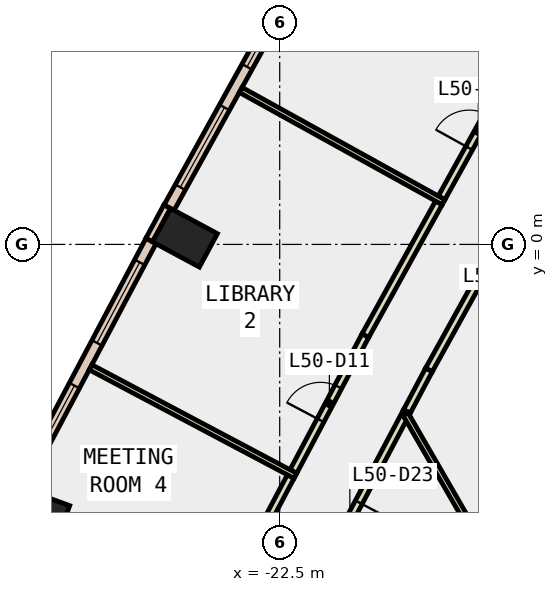
"""IFC4 building model, lengths in metres.
Left out: names, types, materials, properties, quantities, classifications, styles, units other than length and angle.
Written with IfcOpenShell. Run it as: python <this file> out.ifc"""

import sys

from ifc_helpers import new_model, si_unit, direction, frame, frame_2d, origin, origin_2d, place, context, subcontext, project, spatial, rectangle, extrude, element, fill, save


model = new_model("IFC4")
c1 = context("Model", 3, precision=1e-05, world=origin(), true_north=direction((0.0, 1.0)))
c2 = subcontext(c1, "Body", "Model", "MODEL_VIEW")
j1 = project(units=[si_unit("LENGTHUNIT", "METRE"), si_unit("PLANEANGLEUNIT", "RADIAN")], contexts=[c1])
p1 = place(None, origin())
s1 = spatial("IfcSite", under=j1, at=p1, CompositionType="ELEMENT")
p2 = place(p1, origin())
s2 = spatial("IfcBuilding", under=s1, at=p2, CompositionType="ELEMENT")
p3 = place(p2, frame((0.0, 0.0, 223.4)))
s3 = spatial("IfcBuildingStorey", under=s2, at=p3, CompositionType="ELEMENT", Elevation=223.4)
for number, where, z_axis, x_axis in (
    (1, (-24.993, 0.175, -0.4), (0.0, 0.0, 1.0), (0.474, 0.88, 0.0)),
    (2, (-28.856, -7.1, -0.4), (0.0, 0.0, 1.0), (0.347, 0.938, 0.0)),
):
    element("IfcColumn", number, at=place(p3, frame(where, z_axis=z_axis, x_axis=x_axis)), inside=s3, PredefinedType="COLUMN", context=c2, shape_type="SweptSolid", body=[
        extrude(rectangle(XDim=1.0, YDim=1.4, at=origin_2d()), origin(), (0.0, 0.0, 1.0), 4.2),
    ])
p4 = place(p3, frame((-25.46, 0.995, 0.0), z_axis=(0.0, 0.0, 1.0), x_axis=(-0.473852444207, -0.880604259085, 0.0)))
e3 = element("IfcWall", 3, at=p4, inside=s3, PredefinedType="STANDARD", context=c2, shape_type="SweptSolid", body=[
    extrude(rectangle(XDim=1.0, YDim=0.2, at=frame_2d((0.5, 0.0))), origin(), (0.0, 0.0, 1.0), 3.8),
])
p5 = place(p3, frame((-21.902, 7.309, 0.0), z_axis=(0.0, 0.0, 1.0), x_axis=(-0.484163461668, -0.87497756679, 0.0)))
e4 = element("IfcWall", 4, at=p5, inside=s3, PredefinedType="STANDARD", context=c2, shape_type="SweptSolid", body=[
    extrude(rectangle(XDim=7.247, YDim=0.3, at=frame_2d((3.624, 0.0))), origin(), (0.0, 0.0, 1.0), 3.8),
])
p6 = place(p5, frame((0.612, 0.0, 0.9)))
e5 = element("IfcOpeningElement", 5, at=p6, cuts=e4, PredefinedType="OPENING", context=c2, shape_type="SweptSolid", body=[
    extrude(rectangle(XDim=2.4, YDim=2.6, at=frame_2d((1.2, 1.3))), frame((0.0, 0.16, 0.0), z_axis=(0.0, -1.0, 0.0), x_axis=(1.0, 0.0, 0.0)), (0.0, 0.0, 1.0), 0.32),
])
p7 = place(p5, frame((4.235, 0.0, 0.9)))
e6 = element("IfcOpeningElement", 6, at=p7, cuts=e4, PredefinedType="OPENING", context=c2, shape_type="SweptSolid", body=[
    extrude(rectangle(XDim=2.4, YDim=2.6, at=frame_2d((1.2, 1.3))), frame((0.0, 0.16, 0.0), z_axis=(0.0, -1.0, 0.0), x_axis=(1.0, 0.0, 0.0)), (0.0, 0.0, 1.0), 0.32),
])
p8 = place(p3, frame((-25.887, 0.09, 0.0), z_axis=(0.0, 0.0, 1.0), x_axis=(-0.468020680141, -0.8837175131, 0.0)))
e7 = element("IfcWall", 7, at=p8, inside=s3, PredefinedType="STANDARD", context=c2, shape_type="SweptSolid", body=[
    extrude(rectangle(XDim=7.34, YDim=0.3, at=frame_2d((3.67, 0.0))), origin(), (0.0, 0.0, 1.0), 3.8),
])
p9 = place(p8, frame((0.635, 0.0, 0.9)))
e8 = element("IfcOpeningElement", 8, at=p9, cuts=e7, PredefinedType="OPENING", context=c2, shape_type="SweptSolid", body=[
    extrude(rectangle(XDim=2.4, YDim=2.6, at=frame_2d((1.2, 1.3))), frame((0.0, 0.16, 0.0), z_axis=(0.0, -1.0, 0.0), x_axis=(1.0, 0.0, 0.0)), (0.0, 0.0, 1.0), 0.32),
])
p10 = place(p8, frame((4.305, 0.0, 0.9)))
e9 = element("IfcOpeningElement", 9, at=p10, cuts=e7, PredefinedType="OPENING", context=c2, shape_type="SweptSolid", body=[
    extrude(rectangle(XDim=2.4, YDim=2.6, at=frame_2d((1.2, 1.3))), frame((0.0, 0.16, 0.0), z_axis=(0.0, -1.0, 0.0), x_axis=(1.0, 0.0, 0.0)), (0.0, 0.0, 1.0), 0.32),
])
p11 = place(p3, frame((-14.652, 3.783, 0.0), z_axis=(0.0, 0.0, 1.0), x_axis=(-0.484249955458, -0.874929700398, 0.0)))
e10 = element("IfcWall", 10, at=p11, inside=s3, PredefinedType="PARTITIONING", context=c2, shape_type="SweptSolid", body=[
    extrude(rectangle(XDim=8.099, YDim=0.2, at=frame_2d((4.049, 0.0))), origin(), (0.0, 0.0, 1.0), 3.8),
])
p12 = place(p11, frame((3.55, 0.0, 0.0)))
e11 = element("IfcOpeningElement", 11, at=p12, cuts=e10, PredefinedType="OPENING", context=c2, shape_type="SweptSolid", body=[
    extrude(rectangle(XDim=1.0, YDim=2.1, at=frame_2d((0.5, 1.05))), frame((0.0, 0.11, 0.0), z_axis=(0.0, -1.0, 0.0), x_axis=(1.0, 0.0, 0.0)), (0.0, 0.0, 1.0), 0.22),
])
p13 = place(p3, frame((-18.574, -3.303, 0.0), z_axis=(0.0, 0.0, 1.0), x_axis=(-0.468458328651, -0.883485593724, 0.0)))
e12 = element("IfcWall", 12, at=p13, inside=s3, PredefinedType="PARTITIONING", context=c2, shape_type="SweptSolid", body=[
    extrude(rectangle(XDim=1.238, YDim=0.2, at=frame_2d((0.619, 0.0))), origin(), (0.0, 0.0, 1.0), 3.8),
])
p14 = place(p3, frame((-19.154, -4.397, 0.0), z_axis=(0.0, 0.0, 1.0), x_axis=(-0.468118749105, -0.883665568378, 0.0)))
e13 = element("IfcWall", 13, at=p14, inside=s3, PredefinedType="PARTITIONING", context=c2, shape_type="SweptSolid", body=[
    extrude(rectangle(XDim=6.409, YDim=0.2, at=frame_2d((3.204, 0.0))), origin(), (0.0, 0.0, 1.0), 3.8),
])
p15 = place(p14, frame((2.704, 0.0, 0.0)))
e14 = element("IfcOpeningElement", 14, at=p15, cuts=e13, PredefinedType="OPENING", context=c2, shape_type="SweptSolid", body=[
    extrude(rectangle(XDim=1.0, YDim=2.1, at=frame_2d((0.5, 1.05))), frame((0.0, 0.11, 0.0), z_axis=(0.0, -1.0, 0.0), x_axis=(1.0, 0.0, 0.0)), (0.0, 0.0, 1.0), 0.22),
])
p16 = place(p3, frame((-18.24, 1.225, 0.0), z_axis=(0.0, 0.0, 1.0), x_axis=(0.484411997038, 0.874839995156, 0.0)))
e15 = element("IfcWall", 15, at=p16, inside=s3, PredefinedType="PARTITIONING", context=c2, shape_type="SweptSolid", body=[
    extrude(rectangle(XDim=3.993, YDim=0.2, at=frame_2d((1.996, 0.0))), origin(), (0.0, 0.0, 1.0), 3.8),
])
p17 = place(p16, frame((1.496, 0.0, 0.0)))
e16 = element("IfcOpeningElement", 16, at=p17, cuts=e15, PredefinedType="OPENING", context=c2, shape_type="SweptSolid", body=[
    extrude(rectangle(XDim=1.0, YDim=2.1, at=frame_2d((0.5, 1.05))), frame((0.0, 0.11, 0.0), z_axis=(0.0, -1.0, 0.0), x_axis=(1.0, 0.0, 0.0)), (0.0, 0.0, 1.0), 0.22),
])
p18 = place(p3, frame((-22.14, -5.976, 0.0), z_axis=(0.0, 0.0, 1.0), x_axis=(0.467979143965, 0.883739509592, 0.0)))
e17 = element("IfcWall", 17, at=p18, inside=s3, PredefinedType="PARTITIONING", context=c2, shape_type="SweptSolid", body=[
    extrude(rectangle(XDim=4.049, YDim=0.2, at=frame_2d((2.024, 0.0))), origin(), (0.0, 0.0, 1.0), 3.8),
])
p19 = place(p18, frame((1.524, 0.0, 0.0)))
e18 = element("IfcOpeningElement", 18, at=p19, cuts=e17, PredefinedType="OPENING", context=c2, shape_type="SweptSolid", body=[
    extrude(rectangle(XDim=1.0, YDim=2.1, at=frame_2d((0.5, 1.05))), frame((0.0, 0.11, 0.0), z_axis=(0.0, -1.0, 0.0), x_axis=(1.0, 0.0, 0.0)), (0.0, 0.0, 1.0), 0.22),
])
p20 = place(p3, frame((-20.245, -2.398, 0.0), z_axis=(0.0, 0.0, 1.0), x_axis=(0.484328424129, 0.874886265511, 0.0)))
e19 = element("IfcWall", 19, at=p20, inside=s3, PredefinedType="PARTITIONING", context=c2, shape_type="SweptSolid", body=[
    extrude(rectangle(XDim=3.991, YDim=0.2, at=frame_2d((1.996, 0.0))), origin(), (0.0, 0.0, 1.0), 3.8),
])
p21 = place(p3, frame((-23.878, -9.256, 0.0), z_axis=(0.0, 0.0, 1.0), x_axis=(0.46795384568, 0.883752905689, 0.0)))
e20 = element("IfcWall", 20, at=p21, inside=s3, PredefinedType="PARTITIONING", context=c2, shape_type="SweptSolid", body=[
    extrude(rectangle(XDim=3.562, YDim=0.2, at=frame_2d((1.781, 0.0))), origin(), (0.0, 0.0, 1.0), 3.8),
])
p22 = place(p21, frame((1.281, 0.0, 0.0)))
e21 = element("IfcOpeningElement", 21, at=p22, cuts=e20, PredefinedType="OPENING", context=c2, shape_type="SweptSolid", body=[
    extrude(rectangle(XDim=1.0, YDim=2.1, at=frame_2d((0.5, 1.05))), frame((0.0, 0.11, 0.0), z_axis=(0.0, -1.0, 0.0), x_axis=(1.0, 0.0, 0.0)), (0.0, 0.0, 1.0), 0.22),
])
p23 = place(p3, frame((-16.525, -9.079, 0.0), z_axis=(0.0, 0.0, 1.0), x_axis=(-0.499943228252, 0.866058178487, 0.0)))
e22 = element("IfcWall", 22, at=p23, inside=s3, PredefinedType="PARTITIONING", context=c2, shape_type="SweptSolid", body=[
    extrude(rectangle(XDim=5.329, YDim=0.15, at=frame_2d((2.664, 0.0))), origin(), (0.0, 0.0, 1.0), 3.8),
])
p24 = place(p3, frame((-18.189, 1.111, 0.0), z_axis=(0.0, 0.0, 1.0), x_axis=(-0.874928335558, 0.484252421405, 0.0)))
e23 = element("IfcWall", 23, at=p24, inside=s3, PredefinedType="PARTITIONING", context=c2, shape_type="SweptSolid", body=[
    extrude(rectangle(XDim=6.1, YDim=0.15, at=frame_2d((3.05, 0.0))), origin(), (0.0, 0.0, 1.0), 3.8),
])
p25 = place(p3, frame((-22.087, -6.089, 0.0), z_axis=(0.0, 0.0, 1.0), x_axis=(-0.883611647524, 0.468220521079, 0.0)))
e24 = element("IfcWall", 24, at=p25, inside=s3, PredefinedType="PARTITIONING", context=c2, shape_type="SweptSolid", body=[
    extrude(rectangle(XDim=6.1, YDim=0.15, at=frame_2d((3.05, 0.0))), origin(), (0.0, 0.0, 1.0), 3.8),
])
p26 = place(p6, origin())
e25 = element("IfcWindow", 25, at=p26, inside=s3, PartitioningType="SINGLE_PANEL", PredefinedType="WINDOW", context=c2, shape_type="SweptSolid", body=[
    extrude(rectangle(XDim=2.4, YDim=2.6, at=frame_2d((1.2, 1.3))), frame((0.0, 0.03, 0.0), z_axis=(0.0, -1.0, 0.0), x_axis=(1.0, 0.0, 0.0)), (0.0, 0.0, 1.0), 0.06),
])
fill(e5, e25)
p27 = place(p7, origin())
e26 = element("IfcWindow", 26, at=p27, inside=s3, PartitioningType="SINGLE_PANEL", PredefinedType="WINDOW", context=c2, shape_type="SweptSolid", body=[
    extrude(rectangle(XDim=2.4, YDim=2.6, at=frame_2d((1.2, 1.3))), frame((0.0, 0.03, 0.0), z_axis=(0.0, -1.0, 0.0), x_axis=(1.0, 0.0, 0.0)), (0.0, 0.0, 1.0), 0.06),
])
fill(e6, e26)
p28 = place(p9, origin())
e27 = element("IfcWindow", 27, at=p28, inside=s3, PartitioningType="SINGLE_PANEL", PredefinedType="WINDOW", context=c2, shape_type="SweptSolid", body=[
    extrude(rectangle(XDim=2.4, YDim=2.6, at=frame_2d((1.2, 1.3))), frame((0.0, 0.03, 0.0), z_axis=(0.0, -1.0, 0.0), x_axis=(1.0, 0.0, 0.0)), (0.0, 0.0, 1.0), 0.06),
])
fill(e8, e27)
p29 = place(p10, origin())
e28 = element("IfcWindow", 28, at=p29, inside=s3, PartitioningType="SINGLE_PANEL", PredefinedType="WINDOW", context=c2, shape_type="SweptSolid", body=[
    extrude(rectangle(XDim=2.4, YDim=2.6, at=frame_2d((1.2, 1.3))), frame((0.0, 0.03, 0.0), z_axis=(0.0, -1.0, 0.0), x_axis=(1.0, 0.0, 0.0)), (0.0, 0.0, 1.0), 0.06),
])
fill(e9, e28)
p30 = place(p17, origin())
e29 = element("IfcDoor", 29, at=p30, inside=s3, OperationType="SINGLE_SWING_LEFT", PredefinedType="DOOR", context=c2, shape_type="SweptSolid", body=[
    extrude(rectangle(XDim=1.0, YDim=2.1, at=frame_2d((0.5, 1.05))), frame((0.0, 0.025, 0.0), z_axis=(0.0, -1.0, 0.0), x_axis=(1.0, 0.0, 0.0)), (0.0, 0.0, 1.0), 0.05),
])
fill(e16, e29)
p31 = place(p19, origin())
e30 = element("IfcDoor", 30, at=p31, inside=s3, OperationType="SINGLE_SWING_LEFT", PredefinedType="DOOR", context=c2, shape_type="SweptSolid", body=[
    extrude(rectangle(XDim=1.0, YDim=2.1, at=frame_2d((0.5, 1.05))), frame((0.0, 0.025, 0.0), z_axis=(0.0, -1.0, 0.0), x_axis=(1.0, 0.0, 0.0)), (0.0, 0.0, 1.0), 0.05),
])
fill(e18, e30)
p32 = place(p15, origin())
e31 = element("IfcDoor", 31, at=p32, inside=s3, OperationType="SINGLE_SWING_LEFT", PredefinedType="DOOR", context=c2, shape_type="SweptSolid", body=[
    extrude(rectangle(XDim=1.0, YDim=2.1, at=frame_2d((0.5, 1.05))), frame((0.0, 0.025, 0.0), z_axis=(0.0, -1.0, 0.0), x_axis=(1.0, 0.0, 0.0)), (0.0, 0.0, 1.0), 0.05),
])
fill(e14, e31)
save(model, sys.argv[1])
